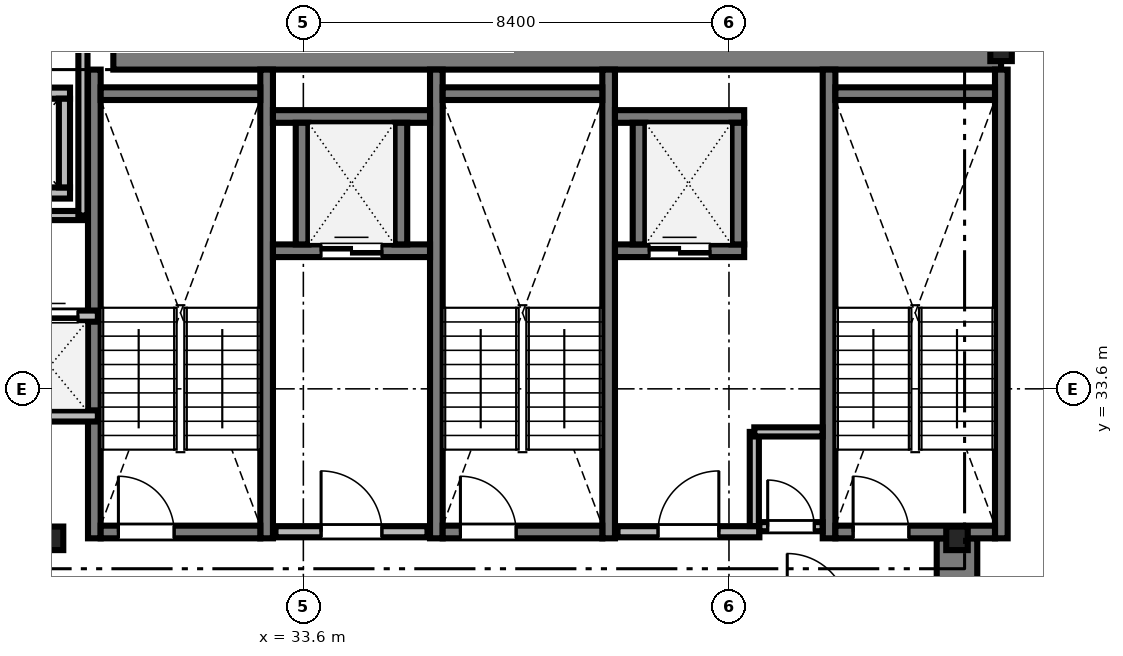
"""IFC4 building model, lengths in metres.
Left out: names, types, materials, properties, quantities, classifications, styles, units other than length and angle.
Written with IfcOpenShell. Run it as: python <this file> out.ifc"""

import sys

from ifc_helpers import new_model, si_unit, direction, frame, frame_2d, origin, origin_2d, place, context, subcontext, project, spatial, rectangle, i_section, extrude, source, transform, mapped, element, fill, save


model = new_model("IFC4")
c1 = context("Model", 3, precision=1e-05, world=origin(), true_north=direction((0.0, 1.0)))
c2 = subcontext(c1, "Body", "Model", "MODEL_VIEW")
j1 = project(units=[si_unit("LENGTHUNIT", "METRE"), si_unit("PLANEANGLEUNIT", "RADIAN")], contexts=[c1])
p1 = place(None, origin())
s1 = spatial("IfcSite", under=j1, at=p1, CompositionType="ELEMENT")
p2 = place(p1, origin())
s2 = spatial("IfcBuilding", under=s1, at=p2, CompositionType="ELEMENT")
p3 = place(p2, frame((0.0, 0.0, 103.7)))
s3 = spatial("IfcBuildingStorey", under=s2, at=p3, CompositionType="ELEMENT", Elevation=103.7)
m1 = source(origin(), c2, "Body", "SweptSolid", [
    extrude(rectangle(XDim=17.52, YDim=0.8, at=frame_2d((8.76, 0.0))), origin(), (0.0, 0.0, 1.0), 3.56),
])
p4 = place(p3, frame((29.85, 40.3, 0.0), z_axis=(0.0, 0.0, 1.0), x_axis=(1.0, 0.0, 0.0)))
e1 = element("IfcWall", 1, at=p4, inside=s3, PredefinedType="SHEAR", context=c2, shape_type="MappedRepresentation", body=[
    mapped(m1, transform((0.0, 0.0, 0.0), scale=1.0)),
])
m2 = source(origin(), c2, "Body", "SweptSolid", [
    extrude(rectangle(XDim=13.15, YDim=0.8, at=frame_2d((6.575, 0.0))), origin(), (0.0, 0.0, 1.0), 3.56),
])
p5 = place(p3, frame((46.5, 17.5, 0.0), z_axis=(0.0, 0.0, 1.0), x_axis=(0.0, 1.0, 0.0)))
e2 = element("IfcWall", 2, at=p5, inside=s3, PredefinedType="SHEAR", context=c2, shape_type="MappedRepresentation", body=[
    mapped(m2, transform((0.0, 0.0, 0.0), scale=1.0)),
])
m3 = source(origin(), c2, "Body", "SweptSolid", [
    extrude(i_section(OverallWidth=0.424, OverallDepth=0.465, WebThickness=0.035, FlangeThickness=0.056, FilletRadius=0.015, at=origin_2d()), origin(), (0.0, 0.0, 1.0), 3.56),
])
for number, where, z_axis, x_axis in (
    (3, (28.65, 30.65, 0.0), (0.0, 0.0, 1.0), (1.0, 0.0, 0.0)),
    (4, (46.5, 30.65, 0.0), (0.0, 0.0, 1.0), (1.0, 0.0, 0.0)),
    (5, (47.37, 40.3, 0.0), (0.0, 0.0, 1.0), (1.0, 0.0, 0.0)),
):
    element("IfcColumn", number, at=place(p3, frame(where, z_axis=z_axis, x_axis=x_axis)), inside=s3, PredefinedType="COLUMN", context=c2, shape_type="MappedRepresentation", body=[
        mapped(m3, transform((0.0, 0.0, 0.0), scale=1.0)),
    ])
m4 = source(origin(), c2, "Body", "SweptSolid", [
    extrude(rectangle(XDim=9.25, YDim=0.25, at=frame_2d((4.625, 0.0))), origin(), (0.0, 0.0, 1.0), 3.6),
])
for number, where, z_axis, x_axis in (
    (6, (29.475, 30.65, 0.0), (0.0, 0.0, 1.0), (0.0, 1.0, 0.0)),
    (7, (32.875, 30.65, 0.0), (0.0, 0.0, 1.0), (0.0, 1.0, 0.0)),
):
    element("IfcWall", number, at=place(p3, frame(where, z_axis=z_axis, x_axis=x_axis)), inside=s3, PredefinedType="SOLIDWALL", context=c2, shape_type="MappedRepresentation", body=[
        mapped(m4, transform((0.0, 0.0, 0.0), scale=1.0)),
    ])
m5 = source(origin(), c2, "Body", "SweptSolid", [
    extrude(rectangle(XDim=3.15, YDim=0.25, at=frame_2d((1.575, 0.0))), origin(), (0.0, 0.0, 1.0), 3.6),
])
p6 = place(p3, frame((29.6, 39.425, 0.0), z_axis=(0.0, 0.0, 1.0), x_axis=(1.0, 0.0, 0.0)))
e8 = element("IfcWall", 8, at=p6, inside=s3, PredefinedType="SOLIDWALL", context=c2, shape_type="MappedRepresentation", body=[
    mapped(m5, transform((0.0, 0.0, 0.0), scale=1.0)),
])
p7 = place(p3, frame((29.6, 30.775, 0.0), z_axis=(0.0, 0.0, 1.0), x_axis=(1.0, 0.0, 0.0)))
e9 = element("IfcWall", 9, at=p7, inside=s3, PredefinedType="SOLIDWALL", context=c2, shape_type="MappedRepresentation", body=[
    mapped(m5, transform((0.0, 0.0, 0.0), scale=1.0)),
])
m6 = source(origin(), c2, "Body", "SweptSolid", [
    extrude(rectangle(XDim=1.1, YDim=2.2, at=frame_2d((0.55, 1.1))), frame((0.0, 0.135, 0.0), z_axis=(0.0, -1.0, 0.0), x_axis=(1.0, 0.0, 0.0)), (0.0, 0.0, 1.0), 0.27),
])
p8 = place(p7, frame((0.35, 0.0, 0.0)))
e10 = element("IfcOpeningElement", 10, at=p8, cuts=e9, PredefinedType="OPENING", context=c2, shape_type="MappedRepresentation", body=[
    mapped(m6, transform((0.0, 0.0, 0.0), scale=1.0)),
])
for number, where, z_axis, x_axis in (
    (11, (36.225, 30.65, 0.0), (0.0, 0.0, 1.0), (0.0, 1.0, 0.0)),
    (12, (39.625, 30.65, 0.0), (0.0, 0.0, 1.0), (0.0, 1.0, 0.0)),
):
    element("IfcWall", number, at=place(p3, frame(where, z_axis=z_axis, x_axis=x_axis)), inside=s3, PredefinedType="SOLIDWALL", context=c2, shape_type="MappedRepresentation", body=[
        mapped(m4, transform((0.0, 0.0, 0.0), scale=1.0)),
    ])
p9 = place(p3, frame((36.35, 39.425, 0.0), z_axis=(0.0, 0.0, 1.0), x_axis=(1.0, 0.0, 0.0)))
e13 = element("IfcWall", 13, at=p9, inside=s3, PredefinedType="SOLIDWALL", context=c2, shape_type="MappedRepresentation", body=[
    mapped(m5, transform((0.0, 0.0, 0.0), scale=1.0)),
])
p10 = place(p3, frame((36.35, 30.775, 0.0), z_axis=(0.0, 0.0, 1.0), x_axis=(1.0, 0.0, 0.0)))
e14 = element("IfcWall", 14, at=p10, inside=s3, PredefinedType="SOLIDWALL", context=c2, shape_type="MappedRepresentation", body=[
    mapped(m5, transform((0.0, 0.0, 0.0), scale=1.0)),
])
p11 = place(p10, frame((0.35, 0.0, 0.0)))
e15 = element("IfcOpeningElement", 15, at=p11, cuts=e14, PredefinedType="OPENING", context=c2, shape_type="MappedRepresentation", body=[
    mapped(m6, transform((0.0, 0.0, 0.0), scale=1.0)),
])
for number, where, z_axis, x_axis in (
    (16, (43.975, 30.65, 0.0), (0.0, 0.0, 1.0), (0.0, 1.0, 0.0)),
    (17, (47.375, 30.65, 0.0), (0.0, 0.0, 1.0), (0.0, 1.0, 0.0)),
):
    element("IfcWall", number, at=place(p3, frame(where, z_axis=z_axis, x_axis=x_axis)), inside=s3, PredefinedType="SOLIDWALL", context=c2, shape_type="MappedRepresentation", body=[
        mapped(m4, transform((0.0, 0.0, 0.0), scale=1.0)),
    ])
p12 = place(p3, frame((44.1, 39.425, 0.0), z_axis=(0.0, 0.0, 1.0), x_axis=(1.0, 0.0, 0.0)))
e18 = element("IfcWall", 18, at=p12, inside=s3, PredefinedType="SOLIDWALL", context=c2, shape_type="MappedRepresentation", body=[
    mapped(m5, transform((0.0, 0.0, 0.0), scale=1.0)),
])
p13 = place(p3, frame((44.1, 30.775, 0.0), z_axis=(0.0, 0.0, 1.0), x_axis=(1.0, 0.0, 0.0)))
e19 = element("IfcWall", 19, at=p13, inside=s3, PredefinedType="SOLIDWALL", context=c2, shape_type="MappedRepresentation", body=[
    mapped(m5, transform((0.0, 0.0, 0.0), scale=1.0)),
])
p14 = place(p13, frame((0.35, 0.0, 0.0)))
e20 = element("IfcOpeningElement", 20, at=p14, cuts=e19, PredefinedType="OPENING", context=c2, shape_type="MappedRepresentation", body=[
    mapped(m6, transform((0.0, 0.0, 0.0), scale=1.0)),
])
m7 = source(origin(), c2, "Body", "SweptSolid", [
    extrude(rectangle(XDim=3.0, YDim=0.22, at=frame_2d((1.5, 0.0))), origin(), (0.0, 0.0, 1.0), 3.56),
])
p15 = place(p3, frame((33.05, 30.78, 0.0), z_axis=(0.0, 0.0, 1.0), x_axis=(1.0, 0.0, 0.0)))
e21 = element("IfcWall", 21, at=p15, inside=s3, PredefinedType="SOLIDWALL", context=c2, shape_type="MappedRepresentation", body=[
    mapped(m7, transform((0.0, 0.0, 0.0), scale=1.0)),
])
m8 = source(origin(), c2, "Body", "SweptSolid", [
    extrude(rectangle(XDim=1.2, YDim=2.2, at=frame_2d((0.6, 1.1))), frame((0.0, 0.12, 0.0), z_axis=(0.0, -1.0, 0.0), x_axis=(1.0, 0.0, 0.0)), (0.0, 0.0, 1.0), 0.24),
])
p16 = place(p15, frame((0.9, 0.0, 0.0)))
e22 = element("IfcOpeningElement", 22, at=p16, cuts=e21, PredefinedType="OPENING", context=c2, shape_type="MappedRepresentation", body=[
    mapped(m8, transform((0.0, 0.0, 0.0), scale=1.0)),
])
m9 = source(origin(), c2, "Body", "SweptSolid", [
    extrude(rectangle(XDim=2.8, YDim=0.22, at=frame_2d((1.4, 0.0))), origin(), (0.0, 0.0, 1.0), 3.56),
])
p17 = place(p3, frame((39.8, 30.78, 0.0), z_axis=(0.0, 0.0, 1.0), x_axis=(1.0, 0.0, 0.0)))
e23 = element("IfcWall", 23, at=p17, inside=s3, PredefinedType="SOLIDWALL", context=c2, shape_type="MappedRepresentation", body=[
    mapped(m9, transform((0.0, 0.0, 0.0), scale=1.0)),
])
p18 = place(p17, frame((0.8, 0.0, 0.0)))
e24 = element("IfcOpeningElement", 24, at=p18, cuts=e23, PredefinedType="OPENING", context=c2, shape_type="MappedRepresentation", body=[
    mapped(m8, transform((0.0, 0.0, 0.0), scale=1.0)),
])
m10 = source(origin(), c2, "Body", "SweptSolid", [
    extrude(rectangle(XDim=1.99, YDim=0.22, at=frame_2d((0.995, 0.0))), origin(), (0.0, 0.0, 1.0), 3.56),
])
for number, where, z_axis, x_axis in (
    (25, (27.005, 37.465, 0.0), (0.0, 0.0, 1.0), (1.0, 0.0, 0.0)),
    (26, (27.005, 39.435, 0.0), (0.0, 0.0, 1.0), (1.0, 0.0, 0.0)),
):
    element("IfcWall", number, at=place(p3, frame(where, z_axis=z_axis, x_axis=x_axis)), inside=s3, PredefinedType="SOLIDWALL", context=c2, shape_type="MappedRepresentation", body=[
        mapped(m10, transform((0.0, 0.0, 0.0), scale=1.0)),
    ])
m11 = source(origin(), c2, "Body", "SweptSolid", [
    extrude(rectangle(XDim=1.75, YDim=0.22, at=frame_2d((0.875, 0.0))), origin(), (0.0, 0.0, 1.0), 3.56),
])
p19 = place(p3, frame((28.885, 37.575, 0.0), z_axis=(0.0, 0.0, 1.0), x_axis=(0.0, 1.0, 0.0)))
e27 = element("IfcWall", 27, at=p19, inside=s3, PredefinedType="SOLIDWALL", context=c2, shape_type="MappedRepresentation", body=[
    mapped(m11, transform((0.0, 0.0, 0.0), scale=1.0)),
])
m12 = source(origin(), c2, "Body", "SweptSolid", [
    extrude(rectangle(XDim=1.89, YDim=0.22, at=frame_2d((0.945, 0.0))), origin(), (0.0, 0.0, 1.0), 3.56),
])
p20 = place(p3, frame((27.655, 33.065, 0.0), z_axis=(0.0, 0.0, 1.0), x_axis=(1.0, 0.0, 0.0)))
e28 = element("IfcWall", 28, at=p20, inside=s3, PredefinedType="SOLIDWALL", context=c2, shape_type="MappedRepresentation", body=[
    mapped(m12, transform((0.0, 0.0, 0.0), scale=1.0)),
])
p21 = place(p3, frame((27.655, 35.035, 0.0), z_axis=(0.0, 0.0, 1.0), x_axis=(1.0, 0.0, 0.0)))
e29 = element("IfcWall", 29, at=p21, inside=s3, PredefinedType="SOLIDWALL", context=c2, shape_type="MappedRepresentation", body=[
    mapped(m12, transform((0.0, 0.0, 0.0), scale=1.0)),
])
m13 = source(origin(), c2, "Body", "SweptSolid", [
    extrude(rectangle(XDim=1.1, YDim=2.2, at=frame_2d((0.55, 1.1))), frame((0.0, 0.12, 0.0), z_axis=(0.0, -1.0, 0.0), x_axis=(1.0, 0.0, 0.0)), (0.0, 0.0, 1.0), 0.24),
])
p22 = place(p21, frame((0.395, 0.0, 0.0)))
e30 = element("IfcOpeningElement", 30, at=p22, cuts=e29, PredefinedType="OPENING", context=c2, shape_type="MappedRepresentation", body=[
    mapped(m13, transform((0.0, 0.0, 0.0), scale=1.0)),
])
m14 = source(origin(), c2, "Body", "SweptSolid", [
    extrude(rectangle(XDim=3.1, YDim=0.25, at=frame_2d((1.55, 0.0))), origin(), (0.0, 0.0, 1.0), 3.56),
])
p23 = place(p3, frame((33.0, 36.325, 0.0), z_axis=(0.0, 0.0, 1.0), x_axis=(1.0, 0.0, 0.0)))
e31 = element("IfcWall", 31, at=p23, inside=s3, PredefinedType="SOLIDWALL", context=c2, shape_type="MappedRepresentation", body=[
    mapped(m14, transform((0.0, 0.0, 0.0), scale=1.0)),
])
m15 = source(origin(), c2, "Body", "SweptSolid", [
    extrude(rectangle(XDim=1.2, YDim=2.25, at=frame_2d((0.6, 1.125))), frame((0.0, 0.135, 0.0), z_axis=(0.0, -1.0, 0.0), x_axis=(1.0, 0.0, 0.0)), (0.0, 0.0, 1.0), 0.27),
])
p24 = place(p23, frame((0.95, 0.0, 0.0)))
e32 = element("IfcOpeningElement", 32, at=p24, cuts=e31, PredefinedType="OPENING", context=c2, shape_type="MappedRepresentation", body=[
    mapped(m15, transform((0.0, 0.0, 0.0), scale=1.0)),
])
p25 = place(p3, frame((33.0, 38.975, 0.0), z_axis=(0.0, 0.0, 1.0), x_axis=(1.0, 0.0, 0.0)))
e33 = element("IfcWall", 33, at=p25, inside=s3, PredefinedType="SOLIDWALL", context=c2, shape_type="MappedRepresentation", body=[
    mapped(m14, transform((0.0, 0.0, 0.0), scale=1.0)),
])
m16 = source(origin(), c2, "Body", "SweptSolid", [
    extrude(rectangle(XDim=2.4, YDim=0.25, at=frame_2d((1.2, 0.0))), origin(), (0.0, 0.0, 1.0), 3.56),
])
for number, where, z_axis, x_axis in (
    (34, (33.575, 36.45, 0.0), (0.0, 0.0, 1.0), (0.0, 1.0, 0.0)),
    (35, (35.525, 36.45, 0.0), (0.0, 0.0, 1.0), (0.0, 1.0, 0.0)),
):
    element("IfcWall", number, at=place(p3, frame(where, z_axis=z_axis, x_axis=x_axis)), inside=s3, PredefinedType="SOLIDWALL", context=c2, shape_type="MappedRepresentation", body=[
        mapped(m16, transform((0.0, 0.0, 0.0), scale=1.0)),
    ])
m17 = source(origin(), c2, "Body", "SweptSolid", [
    extrude(rectangle(XDim=2.55, YDim=0.25, at=frame_2d((1.275, 0.0))), origin(), (0.0, 0.0, 1.0), 3.56),
])
p26 = place(p3, frame((39.75, 36.325, 0.0), z_axis=(0.0, 0.0, 1.0), x_axis=(1.0, 0.0, 0.0)))
e36 = element("IfcWall", 36, at=p26, inside=s3, PredefinedType="SOLIDWALL", context=c2, shape_type="MappedRepresentation", body=[
    mapped(m17, transform((0.0, 0.0, 0.0), scale=1.0)),
])
p27 = place(p26, frame((0.675, 0.0, 0.0)))
e37 = element("IfcOpeningElement", 37, at=p27, cuts=e36, PredefinedType="OPENING", context=c2, shape_type="MappedRepresentation", body=[
    mapped(m15, transform((0.0, 0.0, 0.0), scale=1.0)),
])
p28 = place(p3, frame((39.75, 38.975, 0.0), z_axis=(0.0, 0.0, 1.0), x_axis=(1.0, 0.0, 0.0)))
e38 = element("IfcWall", 38, at=p28, inside=s3, PredefinedType="SOLIDWALL", context=c2, shape_type="MappedRepresentation", body=[
    mapped(m17, transform((0.0, 0.0, 0.0), scale=1.0)),
])
for number, where, z_axis, x_axis in (
    (39, (40.225, 36.45, 0.0), (0.0, 0.0, 1.0), (0.0, 1.0, 0.0)),
    (40, (42.175, 36.45, 0.0), (0.0, 0.0, 1.0), (0.0, 1.0, 0.0)),
):
    element("IfcWall", number, at=place(p3, frame(where, z_axis=z_axis, x_axis=x_axis)), inside=s3, PredefinedType="SOLIDWALL", context=c2, shape_type="MappedRepresentation", body=[
        mapped(m16, transform((0.0, 0.0, 0.0), scale=1.0)),
    ])
m18 = source(origin(), c2, "Body", "SweptSolid", [
    extrude(rectangle(XDim=22.328, YDim=0.18, at=frame_2d((11.164, 0.0))), origin(), (0.0, 0.0, 1.0), 2.802),
])
p29 = place(p3, frame((6.922, 37.02, 0.0), z_axis=(0.0, 0.0, 1.0), x_axis=(1.0, 0.0, 0.0)))
e41 = element("IfcWall", 41, at=p29, inside=s3, PredefinedType="PARTITIONING", context=c2, shape_type="MappedRepresentation", body=[
    mapped(m18, transform((0.0, 0.0, 0.0), scale=1.0)),
])
m19 = source(origin(), c2, "Body", "SweptSolid", [
    extrude(rectangle(XDim=1.05, YDim=2.2, at=frame_2d((0.525, 1.1))), frame((0.0, 0.1, 0.0), z_axis=(0.0, -1.0, 0.0), x_axis=(1.0, 0.0, 0.0)), (0.0, 0.0, 1.0), 0.2),
])
p30 = place(p29, frame((14.928, 0.0, 0.0)))
e42 = element("IfcOpeningElement", 42, at=p30, cuts=e41, PredefinedType="OPENING", context=c2, shape_type="MappedRepresentation", body=[
    mapped(m19, transform((0.0, 0.0, 0.0), scale=1.0)),
])
m20 = source(origin(), c2, "Body", "SweptSolid", [
    extrude(rectangle(XDim=1.248, YDim=0.18, at=frame_2d((0.624, 0.0))), origin(), (0.0, 0.0, 1.0), 3.56),
])
p31 = place(p3, frame((42.6, 30.88, 0.0), z_axis=(0.0, 0.0, 1.0), x_axis=(1.0, 0.0, 0.0)))
e43 = element("IfcWall", 43, at=p31, inside=s3, PredefinedType="PARTITIONING", context=c2, shape_type="MappedRepresentation", body=[
    mapped(m20, transform((0.0, 0.0, 0.0), scale=1.0)),
])
m21 = source(origin(), c2, "Body", "SweptSolid", [
    extrude(rectangle(XDim=0.92, YDim=2.1, at=frame_2d((0.46, 1.05))), frame((0.0, 0.1, 0.0), z_axis=(0.0, -1.0, 0.0), x_axis=(1.0, 0.0, 0.0)), (0.0, 0.0, 1.0), 0.2),
])
p32 = place(p31, frame((0.164, 0.0, 0.0)))
e44 = element("IfcOpeningElement", 44, at=p32, cuts=e43, PredefinedType="OPENING", context=c2, shape_type="MappedRepresentation", body=[
    mapped(m21, transform((0.0, 0.0, 0.0), scale=1.0)),
])
m22 = source(origin(), c2, "Body", "SweptSolid", [
    extrude(rectangle(XDim=11.45, YDim=0.18, at=frame_2d((5.725, 0.0))), origin(), (0.0, 0.0, 1.0), 2.802),
])
p33 = place(p3, frame((29.25, 37.02, 0.0), z_axis=(0.0, 0.0, 1.0), x_axis=(0.0, 1.0, 0.0)))
e45 = element("IfcWall", 45, at=p33, inside=s3, PredefinedType="PARTITIONING", context=c2, shape_type="MappedRepresentation", body=[
    mapped(m22, transform((0.0, 0.0, 0.0), scale=1.0)),
])
m23 = source(origin(), c2, "Body", "SweptSolid", [
    extrude(rectangle(XDim=1.858, YDim=0.18, at=frame_2d((0.929, 0.0))), origin(), (0.0, 0.0, 1.0), 3.56),
])
p34 = place(p3, frame((42.5, 30.892, 0.0), z_axis=(0.0, 0.0, 1.0), x_axis=(0.0, 1.0, 0.0)))
e46 = element("IfcWall", 46, at=p34, inside=s3, PredefinedType="PARTITIONING", context=c2, shape_type="MappedRepresentation", body=[
    mapped(m23, transform((0.0, 0.0, 0.0), scale=1.0)),
])
m24 = source(origin(), c2, "Body", "SweptSolid", [
    extrude(rectangle(XDim=1.348, YDim=0.18, at=frame_2d((0.674, 0.0))), origin(), (0.0, 0.0, 1.0), 3.56),
])
p35 = place(p3, frame((42.5, 32.75, 0.0), z_axis=(0.0, 0.0, 1.0), x_axis=(1.0, 0.0, 0.0)))
e47 = element("IfcWall", 47, at=p35, inside=s3, PredefinedType="PARTITIONING", context=c2, shape_type="MappedRepresentation", body=[
    mapped(m24, transform((0.0, 0.0, 0.0), scale=1.0)),
])
m25 = source(origin(), c2, "Body", "SweptSolid", [
    extrude(rectangle(XDim=1.1, YDim=2.2, at=frame_2d((0.55, 1.1))), frame((0.0, 0.025, 0.0), z_axis=(0.0, -1.0, 0.0), x_axis=(1.0, 0.0, 0.0)), (0.0, 0.0, 1.0), 0.05),
])
p36 = place(p8, origin())
e48 = element("IfcDoor", 48, at=p36, inside=s3, OperationType="SINGLE_SWING_LEFT", PredefinedType="DOOR", context=c2, shape_type="MappedRepresentation", body=[
    mapped(m25, transform((0.0, 0.0, 0.0), scale=1.0)),
])
fill(e10, e48)
p37 = place(p11, origin())
e49 = element("IfcDoor", 49, at=p37, inside=s3, OperationType="SINGLE_SWING_LEFT", PredefinedType="DOOR", context=c2, shape_type="MappedRepresentation", body=[
    mapped(m25, transform((0.0, 0.0, 0.0), scale=1.0)),
])
fill(e15, e49)
p38 = place(p14, origin())
e50 = element("IfcDoor", 50, at=p38, inside=s3, OperationType="SINGLE_SWING_LEFT", PredefinedType="DOOR", context=c2, shape_type="MappedRepresentation", body=[
    mapped(m25, transform((0.0, 0.0, 0.0), scale=1.0)),
])
fill(e20, e50)
m26 = source(origin(), c2, "Body", "SweptSolid", [
    extrude(rectangle(XDim=1.2, YDim=2.2, at=frame_2d((0.6, 1.1))), frame((0.0, 0.025, 0.0), z_axis=(0.0, -1.0, 0.0), x_axis=(1.0, 0.0, 0.0)), (0.0, 0.0, 1.0), 0.05),
])
p39 = place(p16, origin())
e51 = element("IfcDoor", 51, at=p39, inside=s3, OperationType="SINGLE_SWING_LEFT", PredefinedType="DOOR", context=c2, shape_type="MappedRepresentation", body=[
    mapped(m26, transform((0.0, 0.0, 0.0), scale=1.0)),
])
fill(e22, e51)
p40 = place(p18, origin())
e52 = element("IfcDoor", 52, at=p40, inside=s3, OperationType="SINGLE_SWING_RIGHT", PredefinedType="DOOR", context=c2, shape_type="MappedRepresentation", body=[
    mapped(m26, transform((0.0, 0.0, 0.0), scale=1.0)),
])
fill(e24, e52)
p41 = place(p22, origin())
e53 = element("IfcDoor", 53, at=p41, inside=s3, OperationType="DOUBLE_DOOR_SLIDING", PredefinedType="DOOR", context=c2, shape_type="MappedRepresentation", body=[
    mapped(m25, transform((0.0, 0.0, 0.0), scale=1.0)),
])
fill(e30, e53)
m27 = source(origin(), c2, "Body", "SweptSolid", [
    extrude(rectangle(XDim=1.2, YDim=2.25, at=frame_2d((0.6, 1.125))), frame((0.0, 0.025, 0.0), z_axis=(0.0, -1.0, 0.0), x_axis=(1.0, 0.0, 0.0)), (0.0, 0.0, 1.0), 0.05),
])
p42 = place(p24, origin())
e54 = element("IfcDoor", 54, at=p42, inside=s3, OperationType="DOUBLE_DOOR_SLIDING", PredefinedType="DOOR", context=c2, shape_type="MappedRepresentation", body=[
    mapped(m27, transform((0.0, 0.0, 0.0), scale=1.0)),
])
fill(e32, e54)
p43 = place(p27, origin())
e55 = element("IfcDoor", 55, at=p43, inside=s3, OperationType="DOUBLE_DOOR_SLIDING", PredefinedType="DOOR", context=c2, shape_type="MappedRepresentation", body=[
    mapped(m27, transform((0.0, 0.0, 0.0), scale=1.0)),
])
fill(e37, e55)
m28 = source(origin(), c2, "Body", "SweptSolid", [
    extrude(rectangle(XDim=0.92, YDim=2.1, at=frame_2d((0.46, 1.05))), frame((0.0, 0.025, 0.0), z_axis=(0.0, -1.0, 0.0), x_axis=(1.0, 0.0, 0.0)), (0.0, 0.0, 1.0), 0.05),
])
p44 = place(p32, origin())
e56 = element("IfcDoor", 56, at=p44, inside=s3, OperationType="SINGLE_SWING_LEFT", PredefinedType="DOOR", context=c2, shape_type="MappedRepresentation", body=[
    mapped(m28, transform((0.0, 0.0, 0.0), scale=1.0)),
])
fill(e44, e56)
save(model, sys.argv[1])
